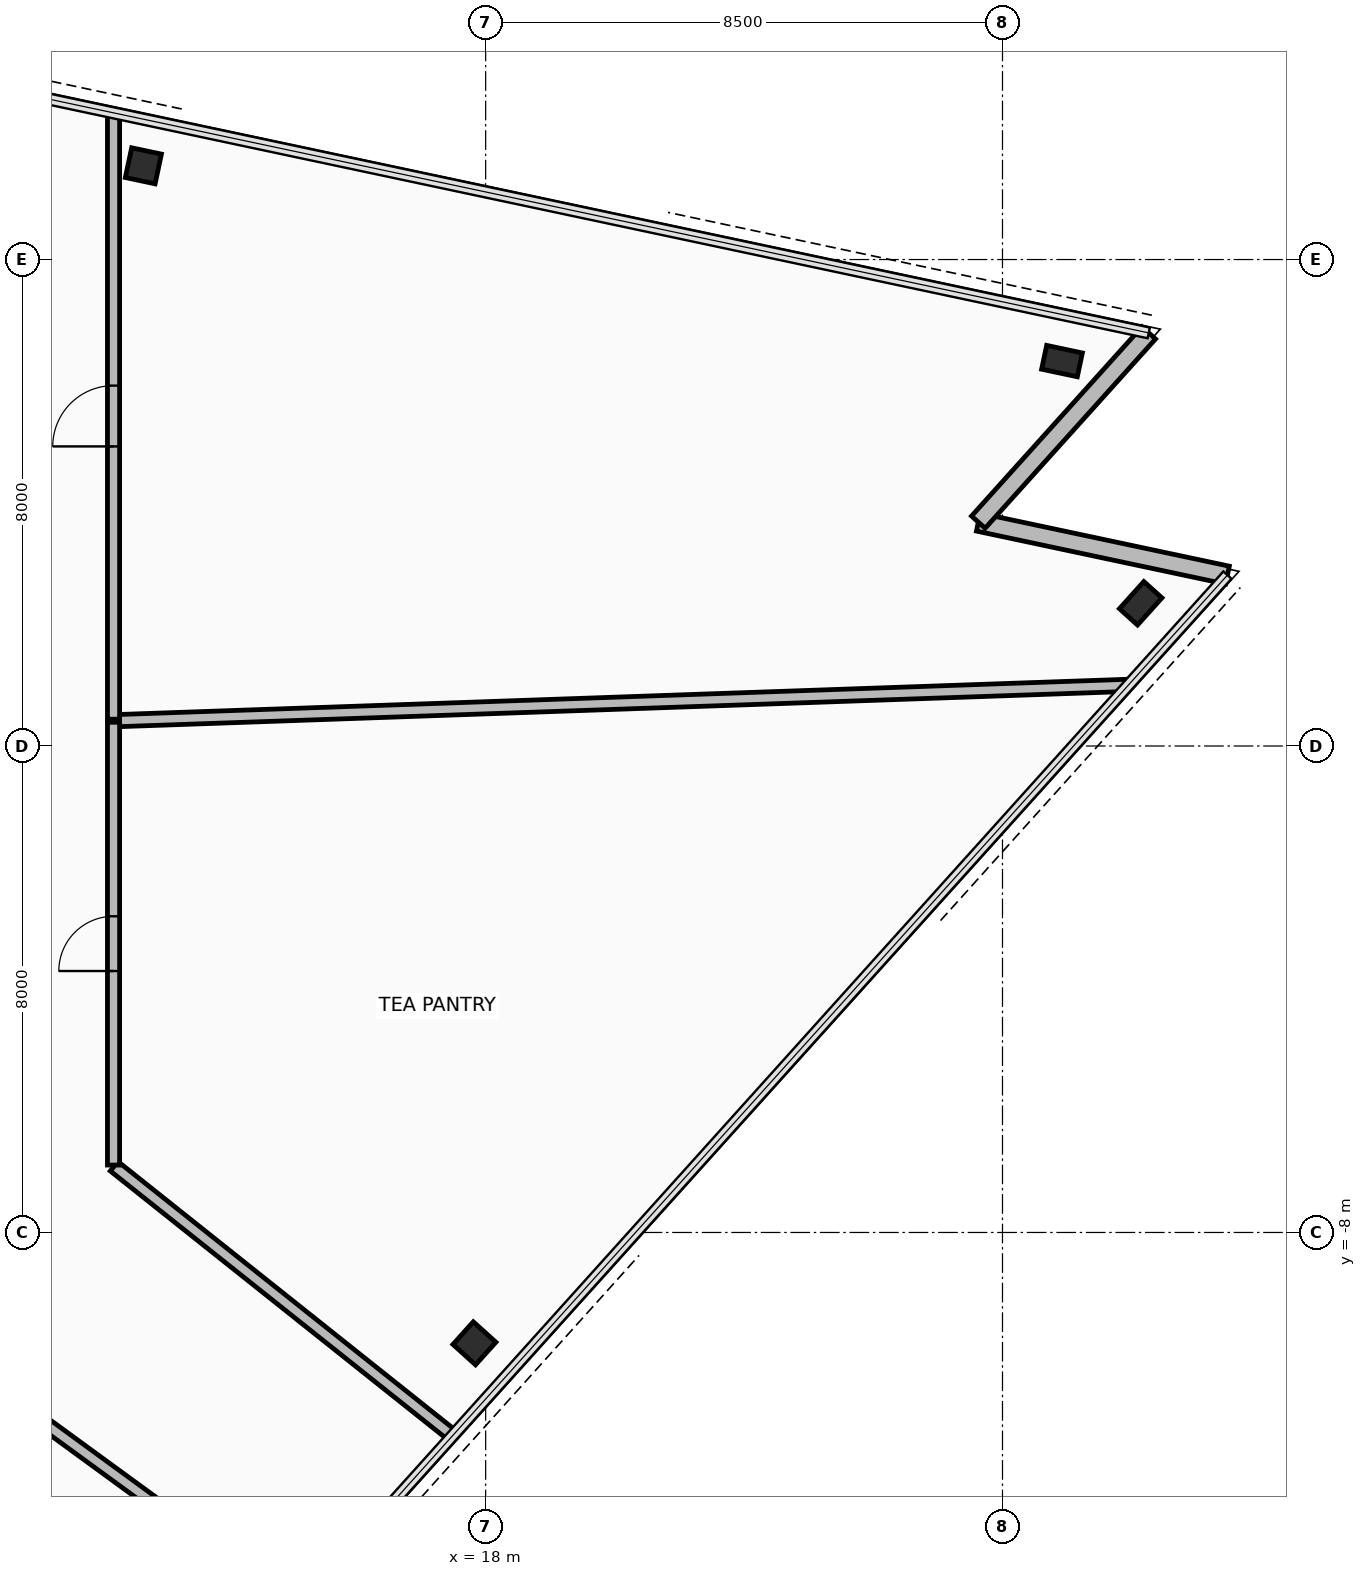
"""IFC4 building model, lengths in metres.
Left out: names, types, materials, properties, quantities, classifications, styles, units other than length and angle.
Written with IfcOpenShell. Run it as: python <this file> out.ifc"""

import sys

from ifc_helpers import new_model, si_unit, direction, frame, frame_2d, origin, origin_2d, place, context, subcontext, project, spatial, rectangle, hollow_rectangle, extrude, element, fill, save


model = new_model("IFC4")
c1 = context("Model", 3, precision=1e-05, world=origin(), true_north=direction((0.0, 1.0)))
c2 = subcontext(c1, "Body", "Model", "MODEL_VIEW")
j1 = project(units=[si_unit("LENGTHUNIT", "METRE"), si_unit("PLANEANGLEUNIT", "RADIAN")], contexts=[c1])
p1 = place(None, origin())
s1 = spatial("IfcSite", under=j1, at=p1, CompositionType="ELEMENT")
p2 = place(p1, origin())
s2 = spatial("IfcBuilding", under=s1, at=p2, CompositionType="ELEMENT")
p3 = place(p2, frame((0.0, 0.0, 204.05)))
s3 = spatial("IfcBuildingStorey", under=s2, at=p3, CompositionType="ELEMENT", Elevation=204.05)
p4 = place(p3, frame((17.815, -9.823, 0.0), z_axis=(0.0, 0.0, 1.0), x_axis=(0.669130606359, 0.743144825477, 0.0)))
e1 = element("IfcColumn", 1, at=p4, inside=s3, PredefinedType="COLUMN", context=c2, shape_type="SweptSolid", body=[
    extrude(hollow_rectangle(XDim=0.5, YDim=0.5, WallThickness=0.032, at=origin_2d()), origin(), (0.0, 0.0, 1.0), 3.6),
])
for number, where, z_axis, x_axis in (
    (2, (28.773, 2.347, 0.0), (0.0, 0.0, 1.0), (0.669, 0.743, 0.0)),
    (3, (27.479, 6.33, 0.0), (0.0, 0.0, 1.0), (-0.978, 0.208, 0.0)),
):
    element("IfcColumn", number, at=place(p3, frame(where, z_axis=z_axis, x_axis=x_axis)), inside=s3, PredefinedType="COLUMN", context=c2, shape_type="SweptSolid", body=[
        extrude(hollow_rectangle(XDim=0.4, YDim=0.6, WallThickness=0.03, at=origin_2d()), origin(), (0.0, 0.0, 1.0), 3.6),
    ])
p5 = place(p3, frame((12.371, 9.542, 0.0), z_axis=(0.0, 0.0, 1.0), x_axis=(-0.978147600734, 0.207911690818, 0.0)))
e4 = element("IfcColumn", 4, at=p5, inside=s3, PredefinedType="COLUMN", context=c2, shape_type="SweptSolid", body=[
    extrude(hollow_rectangle(XDim=0.5, YDim=0.5, WallThickness=0.032, at=origin_2d()), origin(), (0.0, 0.0, 1.0), 3.6),
])
for number, where, z_axis, x_axis in (
    (5, (30.199, 2.811, 0.0), (0.0, 0.0, 1.0), (-0.978, 0.208, 0.0)),
    (6, (26.103, 3.681, 0.0), (0.0, 0.0, 1.0), (0.669, 0.743, 0.0)),
):
    element("IfcWall", number, at=place(p3, frame(where, z_axis=z_axis, x_axis=x_axis)), inside=s3, PredefinedType="STANDARD", context=c2, shape_type="SweptSolid", body=[
        extrude(rectangle(XDim=4.188, YDim=0.3, at=frame_2d((2.094, 0.0))), origin(), (0.0, 0.0, 1.0), 2.715),
    ])
p6 = place(p3, frame((28.556, 0.997, 0.0), z_axis=(0.0, 0.0, 1.0), x_axis=(-0.999390620762, -0.03490540262, 0.0)))
e7 = element("IfcWall", 7, at=p6, inside=s3, PredefinedType="PARTITIONING", context=c2, shape_type="SweptSolid", body=[
    extrude(rectangle(XDim=16.661, YDim=0.2, at=frame_2d((8.33, 0.0))), origin(), (0.0, 0.0, 1.0), 2.715),
])
p7 = place(p3, frame((11.88, 0.441, 0.0), z_axis=(0.0, 0.0, 1.0), x_axis=(0.0, 1.0, 0.0)))
e8 = element("IfcWall", 8, at=p7, inside=s3, PredefinedType="PARTITIONING", context=c2, shape_type="SweptSolid", body=[
    extrude(rectangle(XDim=9.972, YDim=0.2, at=frame_2d((4.986, 0.0))), origin(), (0.0, 0.0, 1.0), 2.715),
])
p8 = place(p7, frame((4.486, 0.0, 0.0)))
e9 = element("IfcOpeningElement", 9, at=p8, cuts=e8, PredefinedType="OPENING", context=c2, shape_type="SweptSolid", body=[
    extrude(rectangle(XDim=1.0, YDim=2.15, at=frame_2d((0.5, 1.075))), frame((0.0, 0.11, 0.0), z_axis=(0.0, -1.0, 0.0), x_axis=(1.0, 0.0, 0.0)), (0.0, 0.0, 1.0), 0.22),
])
p9 = place(p3, frame((9.985, -10.585, 0.0), z_axis=(0.0, 0.0, 1.0), x_axis=(0.807842527243, -0.589398380705, 0.0)))
e10 = element("IfcWall", 10, at=p9, inside=s3, PredefinedType="PARTITIONING", context=c2, shape_type="SweptSolid", body=[
    extrude(rectangle(XDim=6.091, YDim=0.2, at=frame_2d((3.045, 0.0))), origin(), (0.0, 0.0, 1.0), 2.715),
])
p10 = place(p3, frame((17.456, -11.342, 0.0), z_axis=(0.0, 0.0, 1.0), x_axis=(-0.782369623791, 0.622814395923, 0.0)))
e11 = element("IfcWall", 11, at=p10, inside=s3, PredefinedType="PARTITIONING", context=c2, shape_type="SweptSolid", body=[
    extrude(rectangle(XDim=7.115, YDim=0.2, at=frame_2d((3.558, 0.0))), origin(), (0.0, 0.0, 1.0), 2.715),
])
p11 = place(p3, frame((11.88, -6.891, 0.0), z_axis=(0.0, 0.0, 1.0), x_axis=(0.0, 1.0, 0.0)))
e12 = element("IfcWall", 12, at=p11, inside=s3, PredefinedType="PARTITIONING", context=c2, shape_type="SweptSolid", body=[
    extrude(rectangle(XDim=7.282, YDim=0.2, at=frame_2d((3.641, 0.0))), origin(), (0.0, 0.0, 1.0), 3.42),
])
p12 = place(p11, frame((3.191, 0.0, 0.0)))
e13 = element("IfcOpeningElement", 13, at=p12, cuts=e12, PredefinedType="OPENING", context=c2, shape_type="SweptSolid", body=[
    extrude(rectangle(XDim=0.9, YDim=2.1, at=frame_2d((0.45, 1.05))), frame((0.0, 0.11, 0.0), z_axis=(0.0, -1.0, 0.0), x_axis=(1.0, 0.0, 0.0)), (0.0, 0.0, 1.0), 0.22),
])
p13 = place(p8, origin())
e14 = element("IfcDoor", 14, at=p13, inside=s3, OperationType="SINGLE_SWING_RIGHT", PredefinedType="DOOR", context=c2, shape_type="SweptSolid", body=[
    extrude(rectangle(XDim=1.0, YDim=2.15, at=frame_2d((0.5, 1.075))), frame((0.0, 0.025, 0.0), z_axis=(0.0, -1.0, 0.0), x_axis=(1.0, 0.0, 0.0)), (0.0, 0.0, 1.0), 0.05),
])
fill(e9, e14)
p14 = place(p12, origin())
e15 = element("IfcDoor", 15, at=p14, inside=s3, OperationType="SINGLE_SWING_LEFT", PredefinedType="DOOR", context=c2, shape_type="SweptSolid", body=[
    extrude(rectangle(XDim=0.9, YDim=2.1, at=frame_2d((0.45, 1.05))), frame((0.0, 0.025, 0.0), z_axis=(0.0, -1.0, 0.0), x_axis=(1.0, 0.0, 0.0)), (0.0, 0.0, 1.0), 0.05),
])
fill(e13, e15)
save(model, sys.argv[1])
